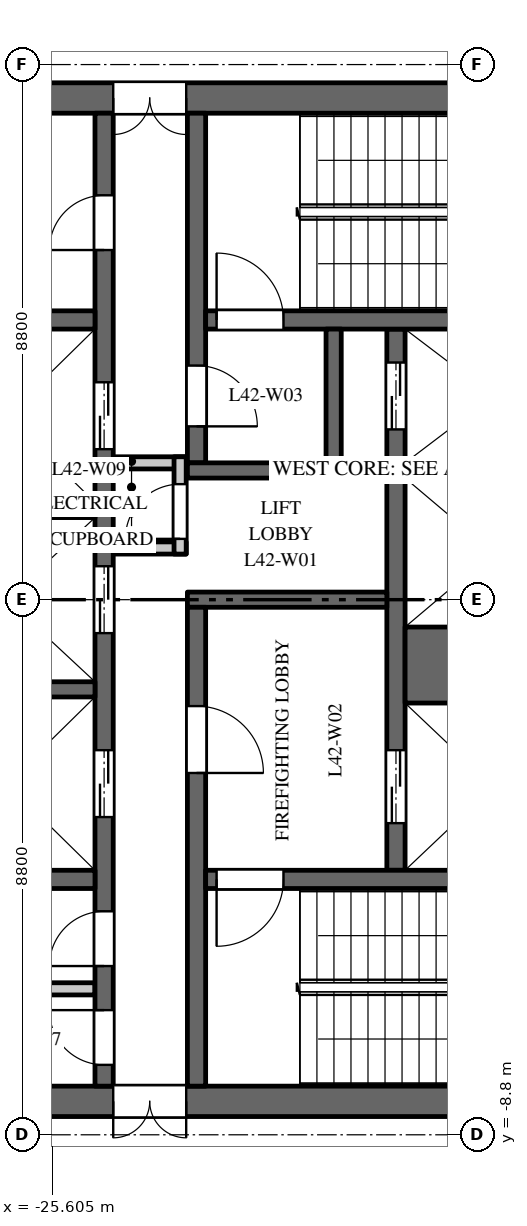
"""IFC4 building model, lengths in metres.
Left out: names, types, materials, properties, quantities, classifications, styles, units other than length and angle.
Written with IfcOpenShell. Run it as: python <this file> out.ifc"""

import sys

from ifc_helpers import new_model, si_unit, direction, frame, frame_2d, origin, place, context, subcontext, project, spatial, rectangle, extrude, element, fill, save


model = new_model("IFC4")
c1 = context("Model", 3, precision=1e-05, world=origin(), true_north=direction((0.0, 1.0)))
c2 = subcontext(c1, "Body", "Model", "MODEL_VIEW")
j1 = project(units=[si_unit("LENGTHUNIT", "METRE"), si_unit("PLANEANGLEUNIT", "RADIAN")], contexts=[c1])
p1 = place(None, origin())
s1 = spatial("IfcSite", under=j1, at=p1, CompositionType="ELEMENT")
p2 = place(p1, origin())
s2 = spatial("IfcBuilding", under=s1, at=p2, CompositionType="ELEMENT")
p3 = place(p2, frame((0.0, 0.0, 182.0)))
s3 = spatial("IfcBuildingStorey", under=s2, at=p3, CompositionType="ELEMENT", Elevation=182.0)
p4 = place(p3, frame((-16.5, 8.25, 0.0), z_axis=(0.0, 0.0, 1.0), x_axis=(-1.0, 0.0, 0.0)))
e1 = element("IfcWall", 1, at=p4, inside=s3, PredefinedType="SHEAR", context=c2, shape_type="SweptSolid", body=[
    extrude(rectangle(XDim=15.0, YDim=0.5, at=frame_2d((7.5, 0.0))), origin(), (0.0, 0.0, 1.0), 3.7),
])
p5 = place(p4, frame((6.9, 0.0, 0.0)))
e2 = element("IfcOpeningElement", 2, at=p5, cuts=e1, PredefinedType="OPENING", context=c2, shape_type="SweptSolid", body=[
    extrude(rectangle(XDim=1.2, YDim=2.1, at=frame_2d((0.6, 1.05))), frame((0.0, 0.26, 0.0), z_axis=(0.0, -1.0, 0.0), x_axis=(1.0, 0.0, 0.0)), (0.0, 0.0, 1.0), 0.52),
])
p6 = place(p4, frame((12.425, 0.0, 0.0)))
e3 = element("IfcOpeningElement", 3, at=p6, cuts=e1, PredefinedType="OPENING", context=c2, shape_type="SweptSolid", body=[
    extrude(rectangle(XDim=0.9, YDim=2.1, at=frame_2d((0.45, 1.05))), frame((0.0, 0.26, 0.0), z_axis=(0.0, -1.0, 0.0), x_axis=(1.0, 0.0, 0.0)), (0.0, 0.0, 1.0), 0.52),
])
p7 = place(p3, frame((-16.5, -8.25, 0.0), z_axis=(0.0, 0.0, 1.0), x_axis=(-1.0, 0.0, 0.0)))
e4 = element("IfcWall", 4, at=p7, inside=s3, PredefinedType="SHEAR", context=c2, shape_type="SweptSolid", body=[
    extrude(rectangle(XDim=15.0, YDim=0.5, at=frame_2d((7.5, 0.0))), origin(), (0.0, 0.0, 1.0), 3.7),
])
p8 = place(p7, frame((6.9, 0.0, 0.0)))
e5 = element("IfcOpeningElement", 5, at=p8, cuts=e4, PredefinedType="OPENING", context=c2, shape_type="SweptSolid", body=[
    extrude(rectangle(XDim=1.2, YDim=2.1, at=frame_2d((0.6, 1.05))), frame((0.0, 0.26, 0.0), z_axis=(0.0, -1.0, 0.0), x_axis=(1.0, 0.0, 0.0)), (0.0, 0.0, 1.0), 0.52),
])
p9 = place(p7, frame((12.275, 0.0, 0.0)))
e6 = element("IfcOpeningElement", 6, at=p9, cuts=e4, PredefinedType="OPENING", context=c2, shape_type="SweptSolid", body=[
    extrude(rectangle(XDim=0.9, YDim=2.1, at=frame_2d((0.45, 1.05))), frame((0.0, 0.26, 0.0), z_axis=(0.0, -1.0, 0.0), x_axis=(1.0, 0.0, 0.0)), (0.0, 0.0, 1.0), 0.52),
])
p10 = place(p3, frame((-19.95, -4.45, 0.0), z_axis=(0.0, 0.0, 1.0), x_axis=(0.0, 1.0, 0.0)))
e7 = element("IfcWall", 7, at=p10, inside=s3, PredefinedType="SHEAR", context=c2, shape_type="SweptSolid", body=[
    extrude(rectangle(XDim=8.9, YDim=0.3, at=frame_2d((4.45, 0.0))), origin(), (0.0, 0.0, 1.0), 3.7),
])
p11 = place(p10, frame((0.775, 0.0, 0.0)))
e8 = element("IfcOpeningElement", 8, at=p11, cuts=e7, PredefinedType="OPENING", context=c2, shape_type="SweptSolid", body=[
    extrude(rectangle(XDim=1.2, YDim=2.1, at=frame_2d((0.6, 1.05))), frame((0.0, 0.16, 0.0), z_axis=(0.0, -1.0, 0.0), x_axis=(1.0, 0.0, 0.0)), (0.0, 0.0, 1.0), 0.32),
])
p12 = place(p10, frame((7.25, 0.0, 0.0)))
e9 = element("IfcOpeningElement", 9, at=p12, cuts=e7, PredefinedType="OPENING", context=c2, shape_type="SweptSolid", body=[
    extrude(rectangle(XDim=1.1, YDim=2.1, at=frame_2d((0.55, 1.05))), frame((0.0, 0.16, 0.0), z_axis=(0.0, -1.0, 0.0), x_axis=(1.0, 0.0, 0.0)), (0.0, 0.0, 1.0), 0.32),
])
p13 = place(p3, frame((-24.75, -8.0, 0.0), z_axis=(0.0, 0.0, 1.0), x_axis=(0.0, 1.0, 0.0)))
e10 = element("IfcWall", 10, at=p13, inside=s3, PredefinedType="SHEAR", context=c2, shape_type="SweptSolid", body=[
    extrude(rectangle(XDim=16.0, YDim=0.3, at=frame_2d((8.0, 0.0))), origin(), (0.0, 0.0, 1.0), 3.7),
])
p14 = place(p13, frame((4.425, 0.0, 0.0)))
e11 = element("IfcOpeningElement", 11, at=p14, cuts=e10, PredefinedType="OPENING", context=c2, shape_type="SweptSolid", body=[
    extrude(rectangle(XDim=1.1, YDim=2.1, at=frame_2d((0.55, 1.05))), frame((0.0, 0.16, 0.0), z_axis=(0.0, -1.0, 0.0), x_axis=(1.0, 0.0, 0.0)), (0.0, 0.0, 1.0), 0.32),
])
p15 = place(p13, frame((7.45, 0.0, 0.0)))
e12 = element("IfcOpeningElement", 12, at=p15, cuts=e10, PredefinedType="OPENING", context=c2, shape_type="SweptSolid", body=[
    extrude(rectangle(XDim=1.1, YDim=2.1, at=frame_2d((0.55, 1.05))), frame((0.0, 0.16, 0.0), z_axis=(0.0, -1.0, 0.0), x_axis=(1.0, 0.0, 0.0)), (0.0, 0.0, 1.0), 0.32),
])
p16 = place(p13, frame((10.475, 0.0, 0.0)))
e13 = element("IfcOpeningElement", 13, at=p16, cuts=e10, PredefinedType="OPENING", context=c2, shape_type="SweptSolid", body=[
    extrude(rectangle(XDim=1.1, YDim=2.1, at=frame_2d((0.55, 1.05))), frame((0.0, 0.16, 0.0), z_axis=(0.0, -1.0, 0.0), x_axis=(1.0, 0.0, 0.0)), (0.0, 0.0, 1.0), 0.32),
])
p17 = place(p13, frame((13.75, 0.0, 0.0)))
e14 = element("IfcOpeningElement", 14, at=p17, cuts=e10, PredefinedType="OPENING", context=c2, shape_type="SweptSolid", body=[
    extrude(rectangle(XDim=0.9, YDim=2.1, at=frame_2d((0.45, 1.05))), frame((0.0, 0.16, 0.0), z_axis=(0.0, -1.0, 0.0), x_axis=(1.0, 0.0, 0.0)), (0.0, 0.0, 1.0), 0.32),
])
p18 = place(p13, frame((1.975, 0.0, 0.0)))
e15 = element("IfcOpeningElement", 15, at=p18, cuts=e10, PredefinedType="OPENING", context=c2, shape_type="SweptSolid", body=[
    extrude(rectangle(XDim=0.9, YDim=2.1, at=frame_2d((0.45, 1.05))), frame((0.0, 0.16, 0.0), z_axis=(0.0, -1.0, 0.0), x_axis=(1.0, 0.0, 0.0)), (0.0, 0.0, 1.0), 0.32),
])
p19 = place(p13, frame((0.35, 0.0, 0.0)))
e16 = element("IfcOpeningElement", 16, at=p19, cuts=e10, PredefinedType="OPENING", context=c2, shape_type="SweptSolid", body=[
    extrude(rectangle(XDim=0.9, YDim=2.1, at=frame_2d((0.45, 1.05))), frame((0.0, 0.16, 0.0), z_axis=(0.0, -1.0, 0.0), x_axis=(1.0, 0.0, 0.0)), (0.0, 0.0, 1.0), 0.32),
])
p20 = place(p3, frame((-20.1, 0.0, 0.0), z_axis=(0.0, 0.0, 1.0), x_axis=(-1.0, 0.0, 0.0)))
e17 = element("IfcWall", 17, at=p20, inside=s3, PredefinedType="SHEAR", context=c2, shape_type="SweptSolid", body=[
    extrude(rectangle(XDim=3.28, YDim=0.25, at=frame_2d((1.64, 0.0))), origin(), (0.0, 0.0, 1.0), 3.7),
])
for number, where, z_axis, x_axis in (
    (18, (-23.4, 0.85, 0.0), (0.0, 0.0, 1.0), (-1.0, 0.0, 0.0)),
    (19, (-23.4, 2.25, 0.0), (0.0, 0.0, 1.0), (-1.0, 0.0, 0.0)),
):
    element("IfcWall", number, at=place(p3, frame(where, z_axis=z_axis, x_axis=x_axis)), inside=s3, PredefinedType="PARTITIONING", context=c2, shape_type="SweptSolid", body=[
        extrude(rectangle(XDim=1.2, YDim=0.2, at=frame_2d((0.6, 0.0))), origin(), (0.0, 0.0, 1.0), 3.7),
    ])
p21 = place(p3, frame((-23.5, 0.75, 0.0), z_axis=(0.0, 0.0, 1.0), x_axis=(0.0, 1.0, 0.0)))
e20 = element("IfcWall", 20, at=p21, inside=s3, PredefinedType="PARTITIONING", context=c2, shape_type="SweptSolid", body=[
    extrude(rectangle(XDim=1.6, YDim=0.2, at=frame_2d((0.8, 0.0))), origin(), (0.0, 0.0, 1.0), 3.7),
])
p22 = place(p21, frame((0.25, 0.0, 0.0)))
e21 = element("IfcOpeningElement", 21, at=p22, cuts=e20, PredefinedType="OPENING", context=c2, shape_type="SweptSolid", body=[
    extrude(rectangle(XDim=0.9, YDim=2.1, at=frame_2d((0.45, 1.05))), frame((0.0, 0.11, 0.0), z_axis=(0.0, -1.0, 0.0), x_axis=(1.0, 0.0, 0.0)), (0.0, 0.0, 1.0), 0.22),
])
p23 = place(p3, frame((-24.9, 4.6, 0.0), z_axis=(0.0, 0.0, 1.0), x_axis=(-1.0, 0.0, 0.0)))
e22 = element("IfcWall", 22, at=p23, inside=s3, PredefinedType="SHEAR", context=c2, shape_type="SweptSolid", body=[
    extrude(rectangle(XDim=6.1, YDim=0.3, at=frame_2d((3.05, 0.0))), origin(), (0.0, 0.0, 1.0), 3.7),
])
p24 = place(p23, frame((4.2, 0.0, 0.0)))
e23 = element("IfcOpeningElement", 23, at=p24, cuts=e22, PredefinedType="OPENING", context=c2, shape_type="SweptSolid", body=[
    extrude(rectangle(XDim=0.9, YDim=2.1, at=frame_2d((0.45, 1.05))), frame((0.0, 0.16, 0.0), z_axis=(0.0, -1.0, 0.0), x_axis=(1.0, 0.0, 0.0)), (0.0, 0.0, 1.0), 0.32),
])
p25 = place(p3, frame((-24.9, -6.4, 0.0), z_axis=(0.0, 0.0, 1.0), x_axis=(-1.0, 0.0, 0.0)))
e24 = element("IfcWall", 24, at=p25, inside=s3, PredefinedType="PARTITIONING", context=c2, shape_type="SweptSolid", body=[
    extrude(rectangle(XDim=2.35, YDim=0.2, at=frame_2d((1.175, 0.0))), origin(), (0.0, 0.0, 1.0), 3.7),
])
p26 = place(p3, frame((-24.9, -4.6, 0.0), z_axis=(0.0, 0.0, 1.0), x_axis=(-1.0, 0.0, 0.0)))
e25 = element("IfcWall", 25, at=p26, inside=s3, PredefinedType="SHEAR", context=c2, shape_type="SweptSolid", body=[
    extrude(rectangle(XDim=6.1, YDim=0.3, at=frame_2d((3.05, 0.0))), origin(), (0.0, 0.0, 1.0), 3.7),
])
p27 = place(p3, frame((-16.9, -1.075, 0.0), z_axis=(0.0, 0.0, 1.0), x_axis=(-1.0, 0.0, 0.0)))
e26 = element("IfcWall", 26, at=p27, inside=s3, PredefinedType="SHEAR", context=c2, shape_type="SweptSolid", body=[
    extrude(rectangle(XDim=2.9, YDim=1.25, at=frame_2d((1.45, 0.0))), origin(), (0.0, 0.0, 1.0), 3.7),
])
for number, where, z_axis, x_axis in (
    (27, (-16.9, 2.125, 0.0), (0.0, 0.0, 1.0), (-1.0, 0.0, 0.0)),
    (28, (-24.9, -1.475, 0.0), (0.0, 0.0, 1.0), (-1.0, 0.0, 0.0)),
    (29, (-24.9, 1.475, 0.0), (0.0, 0.0, 1.0), (-1.0, 0.0, 0.0)),
):
    element("IfcWall", number, at=place(p3, frame(where, z_axis=z_axis, x_axis=x_axis)), inside=s3, PredefinedType="SHEAR", context=c2, shape_type="SweptSolid", body=[
        extrude(rectangle(XDim=2.9, YDim=0.25, at=frame_2d((1.45, 0.0))), origin(), (0.0, 0.0, 1.0), 3.7),
    ])
p28 = place(p3, frame((-23.23, 2.25, 0.0), z_axis=(0.0, 0.0, 1.0), x_axis=(0.0, 1.0, 0.0)))
e30 = element("IfcWall", 30, at=p28, inside=s3, PredefinedType="SHEAR", context=c2, shape_type="SweptSolid", body=[
    extrude(rectangle(XDim=5.75, YDim=0.3, at=frame_2d((2.875, 0.0))), origin(), (0.0, 0.0, 1.0), 3.7),
])
p29 = place(p28, frame((0.6, 0.0, 0.0)))
e31 = element("IfcOpeningElement", 31, at=p29, cuts=e30, PredefinedType="OPENING", context=c2, shape_type="SweptSolid", body=[
    extrude(rectangle(XDim=1.0, YDim=2.1, at=frame_2d((0.5, 1.05))), frame((0.0, 0.16, 0.0), z_axis=(0.0, -1.0, 0.0), x_axis=(1.0, 0.0, 0.0)), (0.0, 0.0, 1.0), 0.32),
])
p30 = place(p3, frame((-23.23, -8.0, 0.0), z_axis=(0.0, 0.0, 1.0), x_axis=(0.0, 1.0, 0.0)))
e32 = element("IfcWall", 32, at=p30, inside=s3, PredefinedType="SHEAR", context=c2, shape_type="SweptSolid", body=[
    extrude(rectangle(XDim=7.875, YDim=0.3, at=frame_2d((3.938, 0.0))), origin(), (0.0, 0.0, 1.0), 3.7),
])
p31 = place(p30, frame((5.15, 0.0, 0.0)))
e33 = element("IfcOpeningElement", 33, at=p31, cuts=e32, PredefinedType="OPENING", context=c2, shape_type="SweptSolid", body=[
    extrude(rectangle(XDim=1.1, YDim=2.1, at=frame_2d((0.55, 1.05))), frame((0.0, 0.16, 0.0), z_axis=(0.0, -1.0, 0.0), x_axis=(1.0, 0.0, 0.0)), (0.0, 0.0, 1.0), 0.32),
])
p32 = place(p3, frame((-16.9, 4.6, 0.0), z_axis=(0.0, 0.0, 1.0), x_axis=(-1.0, 0.0, 0.0)))
e34 = element("IfcWall", 34, at=p32, inside=s3, PredefinedType="SHEAR", context=c2, shape_type="SweptSolid", body=[
    extrude(rectangle(XDim=6.18, YDim=0.3, at=frame_2d((3.09, 0.0))), origin(), (0.0, 0.0, 1.0), 3.7),
])
p33 = place(p32, frame((4.9, 0.0, 0.0)))
e35 = element("IfcOpeningElement", 35, at=p33, cuts=e34, PredefinedType="OPENING", context=c2, shape_type="SweptSolid", body=[
    extrude(rectangle(XDim=1.1, YDim=2.1, at=frame_2d((0.55, 1.05))), frame((0.0, 0.16, 0.0), z_axis=(0.0, -1.0, 0.0), x_axis=(1.0, 0.0, 0.0)), (0.0, 0.0, 1.0), 0.32),
])
p34 = place(p3, frame((-16.9, -4.6, 0.0), z_axis=(0.0, 0.0, 1.0), x_axis=(-1.0, 0.0, 0.0)))
e36 = element("IfcWall", 36, at=p34, inside=s3, PredefinedType="SHEAR", context=c2, shape_type="SweptSolid", body=[
    extrude(rectangle(XDim=6.18, YDim=0.3, at=frame_2d((3.09, 0.0))), origin(), (0.0, 0.0, 1.0), 3.7),
])
p35 = place(p34, frame((4.9, 0.0, 0.0)))
e37 = element("IfcOpeningElement", 37, at=p35, cuts=e36, PredefinedType="OPENING", context=c2, shape_type="SweptSolid", body=[
    extrude(rectangle(XDim=1.1, YDim=2.1, at=frame_2d((0.55, 1.05))), frame((0.0, 0.16, 0.0), z_axis=(0.0, -1.0, 0.0), x_axis=(1.0, 0.0, 0.0)), (0.0, 0.0, 1.0), 0.32),
])
p36 = place(p3, frame((-20.85, 2.125, 0.0), z_axis=(0.0, 0.0, 1.0), x_axis=(-1.0, 0.0, 0.0)))
e38 = element("IfcWall", 38, at=p36, inside=s3, PredefinedType="SHEAR", context=c2, shape_type="SweptSolid", body=[
    extrude(rectangle(XDim=2.53, YDim=0.25, at=frame_2d((1.265, 0.0))), origin(), (0.0, 0.0, 1.0), 3.7),
])
p37 = place(p3, frame((-20.975, 2.25, 0.0), z_axis=(0.0, 0.0, 1.0), x_axis=(0.0, 1.0, 0.0)))
e39 = element("IfcWall", 39, at=p37, inside=s3, PredefinedType="SHEAR", context=c2, shape_type="SweptSolid", body=[
    extrude(rectangle(XDim=2.2, YDim=0.25, at=frame_2d((1.1, 0.0))), origin(), (0.0, 0.0, 1.0), 3.7),
])
p38 = place(p11, origin())
e40 = element("IfcDoor", 40, at=p38, inside=s3, OperationType="DOUBLE_DOOR_SLIDING", PredefinedType="DOOR", context=c2, shape_type="SweptSolid", body=[
    extrude(rectangle(XDim=1.2, YDim=2.1, at=frame_2d((0.6, 1.05))), frame((0.0, 0.025, 0.0), z_axis=(0.0, -1.0, 0.0), x_axis=(1.0, 0.0, 0.0)), (0.0, 0.0, 1.0), 0.05),
])
fill(e8, e40)
p39 = place(p12, origin())
e41 = element("IfcDoor", 41, at=p39, inside=s3, OperationType="DOUBLE_DOOR_SLIDING", PredefinedType="DOOR", context=c2, shape_type="SweptSolid", body=[
    extrude(rectangle(XDim=1.1, YDim=2.1, at=frame_2d((0.55, 1.05))), frame((0.0, 0.025, 0.0), z_axis=(0.0, -1.0, 0.0), x_axis=(1.0, 0.0, 0.0)), (0.0, 0.0, 1.0), 0.05),
])
fill(e9, e41)
p40 = place(p14, origin())
e42 = element("IfcDoor", 42, at=p40, inside=s3, OperationType="DOUBLE_DOOR_SLIDING", PredefinedType="DOOR", context=c2, shape_type="SweptSolid", body=[
    extrude(rectangle(XDim=1.1, YDim=2.1, at=frame_2d((0.55, 1.05))), frame((0.0, 0.025, 0.0), z_axis=(0.0, -1.0, 0.0), x_axis=(1.0, 0.0, 0.0)), (0.0, 0.0, 1.0), 0.05),
])
fill(e11, e42)
p41 = place(p15, origin())
e43 = element("IfcDoor", 43, at=p41, inside=s3, OperationType="DOUBLE_DOOR_SLIDING", PredefinedType="DOOR", context=c2, shape_type="SweptSolid", body=[
    extrude(rectangle(XDim=1.1, YDim=2.1, at=frame_2d((0.55, 1.05))), frame((0.0, 0.025, 0.0), z_axis=(0.0, -1.0, 0.0), x_axis=(1.0, 0.0, 0.0)), (0.0, 0.0, 1.0), 0.05),
])
fill(e12, e43)
p42 = place(p16, origin())
e44 = element("IfcDoor", 44, at=p42, inside=s3, OperationType="DOUBLE_DOOR_SLIDING", PredefinedType="DOOR", context=c2, shape_type="SweptSolid", body=[
    extrude(rectangle(XDim=1.1, YDim=2.1, at=frame_2d((0.55, 1.05))), frame((0.0, 0.025, 0.0), z_axis=(0.0, -1.0, 0.0), x_axis=(1.0, 0.0, 0.0)), (0.0, 0.0, 1.0), 0.05),
])
fill(e13, e44)
p43 = place(p33, origin())
e45 = element("IfcDoor", 45, at=p43, inside=s3, OperationType="SINGLE_SWING_RIGHT", PredefinedType="DOOR", context=c2, shape_type="SweptSolid", body=[
    extrude(rectangle(XDim=1.1, YDim=2.1, at=frame_2d((0.55, 1.05))), frame((0.0, 0.025, 0.0), z_axis=(0.0, -1.0, 0.0), x_axis=(1.0, 0.0, 0.0)), (0.0, 0.0, 1.0), 0.05),
])
fill(e35, e45)
p44 = place(p35, origin())
e46 = element("IfcDoor", 46, at=p44, inside=s3, OperationType="SINGLE_SWING_LEFT", PredefinedType="DOOR", context=c2, shape_type="SweptSolid", body=[
    extrude(rectangle(XDim=1.1, YDim=2.1, at=frame_2d((0.55, 1.05))), frame((0.0, 0.025, 0.0), z_axis=(0.0, -1.0, 0.0), x_axis=(1.0, 0.0, 0.0)), (0.0, 0.0, 1.0), 0.05),
])
fill(e37, e46)
p45 = place(p31, origin())
e47 = element("IfcDoor", 47, at=p45, inside=s3, OperationType="SINGLE_SWING_LEFT", PredefinedType="DOOR", context=c2, shape_type="SweptSolid", body=[
    extrude(rectangle(XDim=1.1, YDim=2.1, at=frame_2d((0.55, 1.05))), frame((0.0, 0.025, 0.0), z_axis=(0.0, -1.0, 0.0), x_axis=(1.0, 0.0, 0.0)), (0.0, 0.0, 1.0), 0.05),
])
fill(e33, e47)
p46 = place(p29, origin())
e48 = element("IfcDoor", 48, at=p46, inside=s3, OperationType="SINGLE_SWING_LEFT", PredefinedType="DOOR", context=c2, shape_type="SweptSolid", body=[
    extrude(rectangle(XDim=1.0, YDim=2.1, at=frame_2d((0.5, 1.05))), frame((0.0, 0.025, 0.0), z_axis=(0.0, -1.0, 0.0), x_axis=(1.0, 0.0, 0.0)), (0.0, 0.0, 1.0), 0.05),
])
fill(e31, e48)
p47 = place(p5, origin())
e49 = element("IfcDoor", 49, at=p47, inside=s3, OperationType="DOUBLE_DOOR_DOUBLE_SWING", PredefinedType="DOOR", context=c2, shape_type="SweptSolid", body=[
    extrude(rectangle(XDim=1.2, YDim=2.1, at=frame_2d((0.6, 1.05))), frame((0.0, 0.025, 0.0), z_axis=(0.0, -1.0, 0.0), x_axis=(1.0, 0.0, 0.0)), (0.0, 0.0, 1.0), 0.05),
])
fill(e2, e49)
p48 = place(p8, origin())
e50 = element("IfcDoor", 50, at=p48, inside=s3, OperationType="DOUBLE_DOOR_DOUBLE_SWING", PredefinedType="DOOR", context=c2, shape_type="SweptSolid", body=[
    extrude(rectangle(XDim=1.2, YDim=2.1, at=frame_2d((0.6, 1.05))), frame((0.0, 0.025, 0.0), z_axis=(0.0, -1.0, 0.0), x_axis=(1.0, 0.0, 0.0)), (0.0, 0.0, 1.0), 0.05),
])
fill(e5, e50)
p49 = place(p17, origin())
e51 = element("IfcDoor", 51, at=p49, inside=s3, OperationType="SINGLE_SWING_RIGHT", PredefinedType="DOOR", context=c2, shape_type="SweptSolid", body=[
    extrude(rectangle(XDim=0.9, YDim=2.1, at=frame_2d((0.45, 1.05))), frame((0.0, 0.025, 0.0), z_axis=(0.0, -1.0, 0.0), x_axis=(1.0, 0.0, 0.0)), (0.0, 0.0, 1.0), 0.05),
])
fill(e14, e51)
p50 = place(p18, origin())
e52 = element("IfcDoor", 52, at=p50, inside=s3, OperationType="SINGLE_SWING_RIGHT", PredefinedType="DOOR", context=c2, shape_type="SweptSolid", body=[
    extrude(rectangle(XDim=0.9, YDim=2.1, at=frame_2d((0.45, 1.05))), frame((0.0, 0.025, 0.0), z_axis=(0.0, -1.0, 0.0), x_axis=(1.0, 0.0, 0.0)), (0.0, 0.0, 1.0), 0.05),
])
fill(e15, e52)
p51 = place(p19, origin())
e53 = element("IfcDoor", 53, at=p51, inside=s3, OperationType="SINGLE_SWING_LEFT", PredefinedType="DOOR", context=c2, shape_type="SweptSolid", body=[
    extrude(rectangle(XDim=0.9, YDim=2.1, at=frame_2d((0.45, 1.05))), frame((0.0, 0.025, 0.0), z_axis=(0.0, -1.0, 0.0), x_axis=(1.0, 0.0, 0.0)), (0.0, 0.0, 1.0), 0.05),
])
fill(e16, e53)
p52 = place(p22, origin())
e54 = element("IfcDoor", 54, at=p52, inside=s3, OperationType="SINGLE_SWING_RIGHT", PredefinedType="DOOR", context=c2, shape_type="SweptSolid", body=[
    extrude(rectangle(XDim=0.9, YDim=2.1, at=frame_2d((0.45, 1.05))), frame((0.0, 0.025, 0.0), z_axis=(0.0, -1.0, 0.0), x_axis=(1.0, 0.0, 0.0)), (0.0, 0.0, 1.0), 0.05),
])
fill(e21, e54)
save(model, sys.argv[1])
